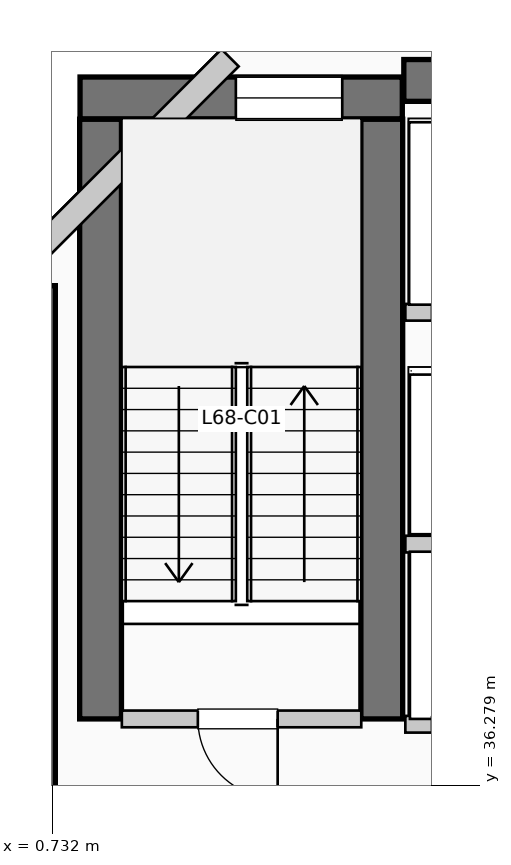
"""IFC4 building model, lengths in metres.
Left out: names, types, materials, properties, quantities, classifications, styles, units other than length and angle.
Written with IfcOpenShell. Run it as: python <this file> out.ifc"""

import sys

from ifc_helpers import new_model, si_unit, direction, frame, frame_2d, origin, place, context, subcontext, project, spatial, rectangle, extrude, element, fill, save


model = new_model("IFC4")
c1 = context("Model", 3, precision=1e-05, world=origin(), true_north=direction((0.0, 1.0)))
c2 = subcontext(c1, "Body", "Model", "MODEL_VIEW")
j1 = project(units=[si_unit("LENGTHUNIT", "METRE"), si_unit("PLANEANGLEUNIT", "RADIAN")], contexts=[c1])
p1 = place(None, origin())
s1 = spatial("IfcSite", under=j1, at=p1, CompositionType="ELEMENT")
p2 = place(p1, origin())
s2 = spatial("IfcBuilding", under=s1, at=p2, CompositionType="ELEMENT")
p3 = place(p2, frame((0.0, 0.0, 280.17)))
s3 = spatial("IfcBuildingStorey", under=s2, at=p3, CompositionType="ELEMENT", Elevation=280.17)
p4 = place(p3, frame((5.36, 45.55, 0.0), z_axis=(0.0, 0.0, 1.0), x_axis=(1.0, 0.0, 0.0)))
e1 = element("IfcWall", 1, at=p4, inside=s3, PredefinedType="SHEAR", context=c2, shape_type="SweptSolid", body=[
    extrude(rectangle(XDim=13.98, YDim=0.55, at=frame_2d((6.99, 0.0))), origin(), (0.0, 0.0, 1.0), 3.96),
])
p5 = place(p3, frame((0.5, 34.95, 0.0), z_axis=(0.0, 0.0, 1.0), x_axis=(0.0, 1.0, 0.0)))
e2 = element("IfcWall", 2, at=p5, inside=s3, PredefinedType="SHEAR", context=c2, shape_type="SweptSolid", body=[
    extrude(rectangle(XDim=7.9, YDim=0.55, at=frame_2d((3.95, 0.0))), origin(), (0.0, 0.0, 1.0), 3.96),
])
for number, where, z_axis, x_axis in (
    (3, (1.37, 37.15, 0.0), (0.0, 0.0, 1.0), (0.0, 1.0, 0.0)),
    (4, (5.07, 37.15, 0.0), (0.0, 0.0, 1.0), (0.0, 1.0, 0.0)),
):
    element("IfcWall", number, at=place(p3, frame(where, z_axis=z_axis, x_axis=x_axis)), inside=s3, PredefinedType="SHEAR", context=c2, shape_type="SweptSolid", body=[
        extrude(rectangle(XDim=7.89, YDim=0.55, at=frame_2d((3.945, 0.0))), origin(), (0.0, 0.0, 1.0), 3.96),
    ])
p6 = place(p3, frame((1.1, 45.32, 0.0), z_axis=(0.0, 0.0, 1.0), x_axis=(1.0, 0.0, 0.0)))
e5 = element("IfcWall", 5, at=p6, inside=s3, PredefinedType="SHEAR", context=c2, shape_type="SweptSolid", body=[
    extrude(rectangle(XDim=4.24, YDim=0.55, at=frame_2d((2.12, 0.0))), origin(), (0.0, 0.0, 1.0), 3.96),
])
p7 = place(p6, frame((2.05, 0.0, 1.05)))
e6 = element("IfcOpeningElement", 6, at=p7, cuts=e5, PredefinedType="OPENING", context=c2, shape_type="SweptSolid", body=[
    extrude(rectangle(XDim=1.4, YDim=1.8, at=frame_2d((0.7, 0.9))), frame((0.0, 0.285, 0.0), z_axis=(0.0, -1.0, 0.0), x_axis=(1.0, 0.0, 0.0)), (0.0, 0.0, 1.0), 0.57),
])
p8 = place(p3, frame((3.074, 45.848, 0.0), z_axis=(0.0, 0.0, 1.0), x_axis=(-0.707106781187, -0.707106781187, 0.0)))
e7 = element("IfcWall", 7, at=p8, inside=s3, PredefinedType="SOLIDWALL", context=c2, shape_type="SweptSolid", body=[
    extrude(rectangle(XDim=4.133, YDim=0.32, at=frame_2d((2.066, 0.0))), origin(), (0.0, 0.0, 1.0), 3.74),
])
p9 = place(p3, frame((1.65, 37.15, 0.0), z_axis=(0.0, 0.0, 1.0), x_axis=(1.0, 0.0, 0.0)))
e8 = element("IfcWall", 8, at=p9, inside=s3, PredefinedType="PARTITIONING", context=c2, shape_type="SweptSolid", body=[
    extrude(rectangle(XDim=3.15, YDim=0.22, at=frame_2d((1.575, 0.0))), origin(), (0.0, 0.0, 1.0), 3.74),
])
p10 = place(p9, frame((2.05, 0.0, 0.0), z_axis=(0.0, 0.0, 1.0), x_axis=(-1.0, 0.0, 0.0)))
e9 = element("IfcOpeningElement", 9, at=p10, cuts=e8, PredefinedType="OPENING", context=c2, shape_type="SweptSolid", body=[
    extrude(rectangle(XDim=1.05, YDim=2.15, at=frame_2d((0.525, 1.075))), frame((0.0, 0.12, 0.0), z_axis=(0.0, -1.0, 0.0), x_axis=(1.0, 0.0, 0.0)), (0.0, 0.0, 1.0), 0.24),
])
p11 = place(p3, frame((5.38, 37.08, 0.0), z_axis=(0.0, 0.0, 1.0), x_axis=(1.0, 0.0, 0.0)))
e10 = element("IfcWall", 10, at=p11, inside=s3, PredefinedType="PARTITIONING", context=c2, shape_type="SweptSolid", body=[
    extrude(rectangle(XDim=3.46, YDim=0.22, at=frame_2d((1.73, 0.0))), origin(), (0.0, 0.0, 1.0), 3.74),
])
p12 = place(p11, frame((1.55, 0.0, 0.0), z_axis=(0.0, 0.0, 1.0), x_axis=(-1.0, 0.0, 0.0)))
e11 = element("IfcOpeningElement", 11, at=p12, cuts=e10, PredefinedType="OPENING", context=c2, shape_type="SweptSolid", body=[
    extrude(rectangle(XDim=1.2, YDim=2.2, at=frame_2d((0.6, 1.1))), frame((0.0, 0.12, 0.0), z_axis=(0.0, -1.0, 0.0), x_axis=(1.0, 0.0, 0.0)), (0.0, 0.0, 1.0), 0.24),
])
p13 = place(p11, frame((3.22, 0.0, 0.0), z_axis=(0.0, 0.0, 1.0), x_axis=(-1.0, 0.0, 0.0)))
e12 = element("IfcOpeningElement", 12, at=p13, cuts=e10, PredefinedType="OPENING", context=c2, shape_type="SweptSolid", body=[
    extrude(rectangle(XDim=1.2, YDim=2.2, at=frame_2d((0.6, 1.1))), frame((0.0, 0.12, 0.0), z_axis=(0.0, -1.0, 0.0), x_axis=(1.0, 0.0, 0.0)), (0.0, 0.0, 1.0), 0.24),
])
p14 = place(p3, frame((5.38, 39.45, 0.0), z_axis=(0.0, 0.0, 1.0), x_axis=(1.0, 0.0, 0.0)))
e13 = element("IfcWall", 13, at=p14, inside=s3, PredefinedType="PARTITIONING", context=c2, shape_type="SweptSolid", body=[
    extrude(rectangle(XDim=3.46, YDim=0.22, at=frame_2d((1.73, 0.0))), origin(), (0.0, 0.0, 1.0), 3.74),
])
p15 = place(p3, frame((5.38, 42.5, 0.0), z_axis=(0.0, 0.0, 1.0), x_axis=(1.0, 0.0, 0.0)))
e14 = element("IfcWall", 14, at=p15, inside=s3, PredefinedType="PARTITIONING", context=c2, shape_type="SweptSolid", body=[
    extrude(rectangle(XDim=3.77, YDim=0.22, at=frame_2d((1.885, 0.0))), origin(), (0.0, 0.0, 1.0), 3.74),
])
p16 = place(p15, frame((1.75, 0.0, 0.0), z_axis=(0.0, 0.0, 1.0), x_axis=(-1.0, 0.0, 0.0)))
e15 = element("IfcOpeningElement", 15, at=p16, cuts=e14, PredefinedType="OPENING", context=c2, shape_type="SweptSolid", body=[
    extrude(rectangle(XDim=1.4, YDim=2.2, at=frame_2d((0.7, 1.1))), frame((0.0, 0.12, 0.0), z_axis=(0.0, -1.0, 0.0), x_axis=(1.0, 0.0, 0.0)), (0.0, 0.0, 1.0), 0.24),
])
p17 = place(p15, frame((3.53, 0.0, 0.0), z_axis=(0.0, 0.0, 1.0), x_axis=(-1.0, 0.0, 0.0)))
e16 = element("IfcOpeningElement", 16, at=p17, cuts=e14, PredefinedType="OPENING", context=c2, shape_type="SweptSolid", body=[
    extrude(rectangle(XDim=1.4, YDim=2.2, at=frame_2d((0.7, 1.1))), frame((0.0, 0.12, 0.0), z_axis=(0.0, -1.0, 0.0), x_axis=(1.0, 0.0, 0.0)), (0.0, 0.0, 1.0), 0.24),
])
p18 = place(p7, origin())
e17 = element("IfcWindow", 17, at=p18, inside=s3, PartitioningType="SINGLE_PANEL", PredefinedType="WINDOW", context=c2, shape_type="SweptSolid", body=[
    extrude(rectangle(XDim=1.4, YDim=1.8, at=frame_2d((0.7, 0.9))), frame((0.0, 0.03, 0.0), z_axis=(0.0, -1.0, 0.0), x_axis=(1.0, 0.0, 0.0)), (0.0, 0.0, 1.0), 0.06),
])
fill(e6, e17)
p19 = place(p10, origin())
e18 = element("IfcDoor", 18, at=p19, inside=s3, OperationType="SINGLE_SWING_RIGHT", PredefinedType="DOOR", context=c2, shape_type="SweptSolid", body=[
    extrude(rectangle(XDim=1.05, YDim=2.15, at=frame_2d((0.525, 1.075))), frame((0.0, 0.025, 0.0), z_axis=(0.0, -1.0, 0.0), x_axis=(1.0, 0.0, 0.0)), (0.0, 0.0, 1.0), 0.05),
])
fill(e9, e18)
save(model, sys.argv[1])
